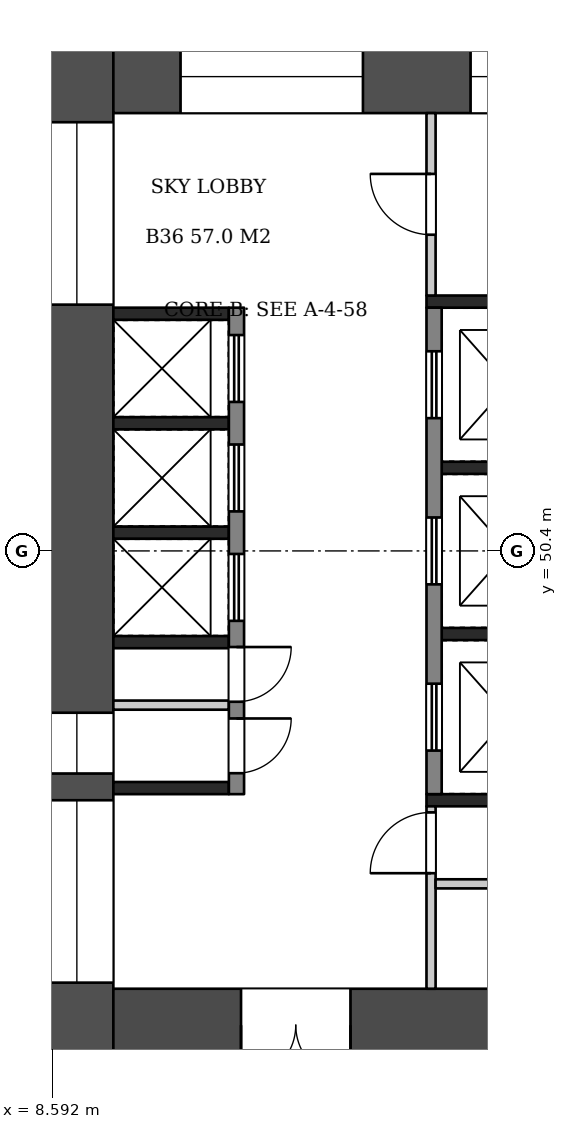
"""IFC4 building model, lengths in metres.
Left out: names, types, materials, properties, quantities, classifications, styles, units other than length and angle.
Written with IfcOpenShell. Run it as: python <this file> out.ifc"""

import sys

from ifc_helpers import new_model, si_unit, direction, frame, frame_2d, origin, place, context, subcontext, project, spatial, rectangle, extrude, element, fill, save


model = new_model("IFC4")
c1 = context("Model", 3, precision=1e-05, world=origin(), true_north=direction((0.0, 1.0)))
c2 = subcontext(c1, "Body", "Model", "MODEL_VIEW")
j1 = project(units=[si_unit("LENGTHUNIT", "METRE"), si_unit("PLANEANGLEUNIT", "RADIAN")], contexts=[c1])
p1 = place(None, origin())
s1 = spatial("IfcSite", under=j1, at=p1, CompositionType="ELEMENT")
p2 = place(p1, origin())
s2 = spatial("IfcBuilding", under=s1, at=p2, CompositionType="ELEMENT")
p3 = place(p2, frame((0.0, 0.0, 140.7)))
s3 = spatial("IfcBuildingStorey", under=s2, at=p3, CompositionType="ELEMENT", Elevation=140.7)
p4 = place(p3, frame((9.0, 58.8, 0.0), z_axis=(0.0, 0.0, 1.0), x_axis=(0.0, -1.0, 0.0)))
e1 = element("IfcWall", 1, at=p4, inside=s3, PredefinedType="SHEAR", context=c2, shape_type="SweptSolid", body=[
    extrude(rectangle(XDim=16.8, YDim=1.2, at=frame_2d((8.4, 0.0))), origin(), (0.0, 0.0, 1.0), 6.72),
])
p5 = place(p4, frame((1.35, 0.0, 0.6)))
e2 = element("IfcOpeningElement", 2, at=p5, cuts=e1, PredefinedType="OPENING", context=c2, shape_type="SweptSolid", body=[
    extrude(rectangle(XDim=3.0, YDim=2.1, at=frame_2d((1.5, 1.05))), frame((0.0, 0.61, 0.0), z_axis=(0.0, -1.0, 0.0), x_axis=(1.0, 0.0, 0.0)), (0.0, 0.0, 1.0), 1.22),
])
p6 = place(p4, frame((11.061, 0.0, 1.6)))
e3 = element("IfcOpeningElement", 3, at=p6, cuts=e1, PredefinedType="OPENING", context=c2, shape_type="SweptSolid", body=[
    extrude(rectangle(XDim=1.0, YDim=1.2, at=frame_2d((0.5, 0.6))), frame((0.0, 0.61, 0.0), z_axis=(0.0, -1.0, 0.0), x_axis=(1.0, 0.0, 0.0)), (0.0, 0.0, 1.0), 1.22),
])
p7 = place(p4, frame((12.5, 0.0, 0.6)))
e4 = element("IfcOpeningElement", 4, at=p7, cuts=e1, PredefinedType="OPENING", context=c2, shape_type="SweptSolid", body=[
    extrude(rectangle(XDim=3.0, YDim=2.1, at=frame_2d((1.5, 1.05))), frame((0.0, 0.61, 0.0), z_axis=(0.0, -1.0, 0.0), x_axis=(1.0, 0.0, 0.0)), (0.0, 0.0, 1.0), 1.22),
])
p8 = place(p3, frame((9.6, 58.2, 0.0), z_axis=(0.0, 0.0, 1.0), x_axis=(1.0, 0.0, 0.0)))
e5 = element("IfcWall", 5, at=p8, inside=s3, PredefinedType="SHEAR", context=c2, shape_type="SweptSolid", body=[
    extrude(rectangle(XDim=14.4, YDim=1.2, at=frame_2d((7.2, 0.0))), origin(), (0.0, 0.0, 1.0), 6.72),
])
p9 = place(p8, frame((1.105, 0.0, 0.6)))
e6 = element("IfcOpeningElement", 6, at=p9, cuts=e5, PredefinedType="OPENING", context=c2, shape_type="SweptSolid", body=[
    extrude(rectangle(XDim=3.0, YDim=2.1, at=frame_2d((1.5, 1.05))), frame((0.0, 0.61, 0.0), z_axis=(0.0, -1.0, 0.0), x_axis=(1.0, 0.0, 0.0)), (0.0, 0.0, 1.0), 1.22),
])
p10 = place(p8, frame((5.875, 0.0, 0.6)))
e7 = element("IfcOpeningElement", 7, at=p10, cuts=e5, PredefinedType="OPENING", context=c2, shape_type="SweptSolid", body=[
    extrude(rectangle(XDim=2.4, YDim=2.1, at=frame_2d((1.2, 1.05))), frame((0.0, 0.61, 0.0), z_axis=(0.0, -1.0, 0.0), x_axis=(1.0, 0.0, 0.0)), (0.0, 0.0, 1.0), 1.22),
])
p11 = place(p8, frame((9.993, 0.0, 0.5)))
e8 = element("IfcOpeningElement", 8, at=p11, cuts=e5, PredefinedType="OPENING", context=c2, shape_type="SweptSolid", body=[
    extrude(rectangle(XDim=1.2, YDim=2.4, at=frame_2d((0.6, 1.2))), frame((0.0, 0.61, 0.0), z_axis=(0.0, -1.0, 0.0), x_axis=(1.0, 0.0, 0.0)), (0.0, 0.0, 1.0), 1.22),
])
p12 = place(p8, frame((12.197, 0.0, 0.5)))
e9 = element("IfcOpeningElement", 9, at=p12, cuts=e5, PredefinedType="OPENING", context=c2, shape_type="SweptSolid", body=[
    extrude(rectangle(XDim=1.2, YDim=2.4, at=frame_2d((0.6, 1.2))), frame((0.0, 0.61, 0.0), z_axis=(0.0, -1.0, 0.0), x_axis=(1.0, 0.0, 0.0)), (0.0, 0.0, 1.0), 1.22),
])
p13 = place(p3, frame((9.6, 42.6, 0.0), z_axis=(0.0, 0.0, 1.0), x_axis=(1.0, 0.0, 0.0)))
e10 = element("IfcWall", 10, at=p13, inside=s3, PredefinedType="SHEAR", context=c2, shape_type="SweptSolid", body=[
    extrude(rectangle(XDim=14.4, YDim=1.2, at=frame_2d((7.2, 0.0))), origin(), (0.0, 0.0, 1.0), 6.72),
])
p14 = place(p13, frame((2.1, 0.0, 0.0)))
e11 = element("IfcOpeningElement", 11, at=p14, cuts=e10, PredefinedType="OPENING", context=c2, shape_type="SweptSolid", body=[
    extrude(rectangle(XDim=1.8, YDim=2.1, at=frame_2d((0.9, 1.05))), frame((0.0, 0.61, 0.0), z_axis=(0.0, -1.0, 0.0), x_axis=(1.0, 0.0, 0.0)), (0.0, 0.0, 1.0), 1.22),
])
for number, where, z_axis, x_axis in (
    (12, (9.6, 54.3, 0.0), (0.0, 0.0, 1.0), (1.0, 0.0, 0.0)),
    (13, (9.6, 52.5, 0.0), (0.0, 0.0, 1.0), (1.0, 0.0, 0.0)),
    (14, (9.6, 50.7, 0.0), (0.0, 0.0, 1.0), (1.0, 0.0, 0.0)),
    (15, (9.6, 48.9, 0.0), (0.0, 0.0, 1.0), (1.0, 0.0, 0.0)),
    (16, (9.6, 46.5, 0.0), (0.0, 0.0, 1.0), (1.0, 0.0, 0.0)),
):
    element("IfcWall", number, at=place(p3, frame(where, z_axis=z_axis, x_axis=x_axis)), inside=s3, PredefinedType="SHEAR", context=c2, shape_type="SweptSolid", body=[
        extrude(rectangle(XDim=1.9, YDim=0.2, at=frame_2d((0.95, 0.0))), origin(), (0.0, 0.0, 1.0), 6.72),
    ])
p15 = place(p3, frame((9.6, 47.864, 0.0), z_axis=(0.0, 0.0, 1.0), x_axis=(1.0, 0.0, 0.0)))
e17 = element("IfcWall", 17, at=p15, inside=s3, PredefinedType="PARTITIONING", context=c2, shape_type="SweptSolid", body=[
    extrude(rectangle(XDim=1.9, YDim=0.15, at=frame_2d((0.95, 0.0))), origin(), (0.0, 0.0, 1.0), 6.72),
])
p16 = place(p3, frame((11.625, 54.4, 0.0), z_axis=(0.0, 0.0, 1.0), x_axis=(0.0, -1.0, 0.0)))
e18 = element("IfcWall", 18, at=p16, inside=s3, PredefinedType="SHEAR", context=c2, shape_type="SweptSolid", body=[
    extrude(rectangle(XDim=8.0, YDim=0.25, at=frame_2d((4.0, 0.0))), origin(), (0.0, 0.0, 1.0), 6.72),
])
p17 = place(p16, frame((0.45, 0.0, 0.0)))
e19 = element("IfcOpeningElement", 19, at=p17, cuts=e18, PredefinedType="OPENING", context=c2, shape_type="SweptSolid", body=[
    extrude(rectangle(XDim=1.1, YDim=2.1, at=frame_2d((0.55, 1.05))), frame((0.0, 0.135, 0.0), z_axis=(0.0, -1.0, 0.0), x_axis=(1.0, 0.0, 0.0)), (0.0, 0.0, 1.0), 0.27),
])
p18 = place(p16, frame((2.25, 0.0, 0.0)))
e20 = element("IfcOpeningElement", 20, at=p18, cuts=e18, PredefinedType="OPENING", context=c2, shape_type="SweptSolid", body=[
    extrude(rectangle(XDim=1.1, YDim=2.1, at=frame_2d((0.55, 1.05))), frame((0.0, 0.135, 0.0), z_axis=(0.0, -1.0, 0.0), x_axis=(1.0, 0.0, 0.0)), (0.0, 0.0, 1.0), 0.27),
])
p19 = place(p16, frame((4.05, 0.0, 0.0)))
e21 = element("IfcOpeningElement", 21, at=p19, cuts=e18, PredefinedType="OPENING", context=c2, shape_type="SweptSolid", body=[
    extrude(rectangle(XDim=1.1, YDim=2.1, at=frame_2d((0.55, 1.05))), frame((0.0, 0.135, 0.0), z_axis=(0.0, -1.0, 0.0), x_axis=(1.0, 0.0, 0.0)), (0.0, 0.0, 1.0), 0.27),
])
p20 = place(p16, frame((5.581, 0.0, 0.0)))
e22 = element("IfcOpeningElement", 22, at=p20, cuts=e18, PredefinedType="OPENING", context=c2, shape_type="SweptSolid", body=[
    extrude(rectangle(XDim=0.9, YDim=2.1, at=frame_2d((0.45, 1.05))), frame((0.0, 0.135, 0.0), z_axis=(0.0, -1.0, 0.0), x_axis=(1.0, 0.0, 0.0)), (0.0, 0.0, 1.0), 0.27),
])
p21 = place(p16, frame((6.756, 0.0, 0.0)))
e23 = element("IfcOpeningElement", 23, at=p21, cuts=e18, PredefinedType="OPENING", context=c2, shape_type="SweptSolid", body=[
    extrude(rectangle(XDim=0.9, YDim=2.1, at=frame_2d((0.45, 1.05))), frame((0.0, 0.135, 0.0), z_axis=(0.0, -1.0, 0.0), x_axis=(1.0, 0.0, 0.0)), (0.0, 0.0, 1.0), 0.27),
])
for number, where, z_axis, x_axis in (
    (24, (15.0, 51.767, 0.0), (0.0, 0.0, 1.0), (1.0, 0.0, 0.0)),
    (25, (15.0, 49.033, 0.0), (0.0, 0.0, 1.0), (1.0, 0.0, 0.0)),
):
    element("IfcWall", number, at=place(p3, frame(where, z_axis=z_axis, x_axis=x_axis)), inside=s3, PredefinedType="SHEAR", context=c2, shape_type="SweptSolid", body=[
        extrude(rectangle(XDim=1.9, YDim=0.2, at=frame_2d((0.95, 0.0))), origin(), (0.0, 0.0, 1.0), 6.72),
    ])
p22 = place(p3, frame((14.875, 54.4, 0.0), z_axis=(0.0, 0.0, 1.0), x_axis=(0.0, -1.0, 0.0)))
e26 = element("IfcWall", 26, at=p22, inside=s3, PredefinedType="SHEAR", context=c2, shape_type="SweptSolid", body=[
    extrude(rectangle(XDim=8.0, YDim=0.25, at=frame_2d((4.0, 0.0))), origin(), (0.0, 0.0, 1.0), 6.72),
])
p23 = place(p22, frame((0.717, 0.0, 0.0)))
e27 = element("IfcOpeningElement", 27, at=p23, cuts=e26, PredefinedType="OPENING", context=c2, shape_type="SweptSolid", body=[
    extrude(rectangle(XDim=1.1, YDim=2.1, at=frame_2d((0.55, 1.05))), frame((0.0, 0.135, 0.0), z_axis=(0.0, -1.0, 0.0), x_axis=(1.0, 0.0, 0.0)), (0.0, 0.0, 1.0), 0.27),
])
p24 = place(p22, frame((3.45, 0.0, 0.0)))
e28 = element("IfcOpeningElement", 28, at=p24, cuts=e26, PredefinedType="OPENING", context=c2, shape_type="SweptSolid", body=[
    extrude(rectangle(XDim=1.1, YDim=2.1, at=frame_2d((0.55, 1.05))), frame((0.0, 0.135, 0.0), z_axis=(0.0, -1.0, 0.0), x_axis=(1.0, 0.0, 0.0)), (0.0, 0.0, 1.0), 0.27),
])
p25 = place(p22, frame((6.183, 0.0, 0.0)))
e29 = element("IfcOpeningElement", 29, at=p25, cuts=e26, PredefinedType="OPENING", context=c2, shape_type="SweptSolid", body=[
    extrude(rectangle(XDim=1.1, YDim=2.1, at=frame_2d((0.55, 1.05))), frame((0.0, 0.135, 0.0), z_axis=(0.0, -1.0, 0.0), x_axis=(1.0, 0.0, 0.0)), (0.0, 0.0, 1.0), 0.27),
])
p26 = place(p3, frame((14.75, 54.5, 0.0), z_axis=(0.0, 0.0, 1.0), x_axis=(1.0, 0.0, 0.0)))
e30 = element("IfcWall", 30, at=p26, inside=s3, PredefinedType="SHEAR", context=c2, shape_type="SweptSolid", body=[
    extrude(rectangle(XDim=2.4, YDim=0.2, at=frame_2d((1.2, 0.0))), origin(), (0.0, 0.0, 1.0), 6.72),
])
p27 = place(p3, frame((14.825, 57.6, 0.0), z_axis=(0.0, 0.0, 1.0), x_axis=(0.0, -1.0, 0.0)))
e31 = element("IfcWall", 31, at=p27, inside=s3, PredefinedType="PARTITIONING", context=c2, shape_type="SweptSolid", body=[
    extrude(rectangle(XDim=3.0, YDim=0.15, at=frame_2d((1.5, 0.0))), origin(), (0.0, 0.0, 1.0), 6.72),
])
p28 = place(p27, frame((1.0, 0.0, 0.0)))
e32 = element("IfcOpeningElement", 32, at=p28, cuts=e31, PredefinedType="OPENING", context=c2, shape_type="SweptSolid", body=[
    extrude(rectangle(XDim=1.0, YDim=2.1, at=frame_2d((0.5, 1.05))), frame((0.0, 0.085, 0.0), z_axis=(0.0, -1.0, 0.0), x_axis=(1.0, 0.0, 0.0)), (0.0, 0.0, 1.0), 0.17),
])
p29 = place(p3, frame((14.75, 46.3, 0.0), z_axis=(0.0, 0.0, 1.0), x_axis=(1.0, 0.0, 0.0)))
e33 = element("IfcWall", 33, at=p29, inside=s3, PredefinedType="SHEAR", context=c2, shape_type="SweptSolid", body=[
    extrude(rectangle(XDim=9.25, YDim=0.2, at=frame_2d((4.625, 0.0))), origin(), (0.0, 0.0, 1.0), 6.72),
])
p30 = place(p3, frame((14.825, 46.2, 0.0), z_axis=(0.0, 0.0, 1.0), x_axis=(0.0, -1.0, 0.0)))
e34 = element("IfcWall", 34, at=p30, inside=s3, PredefinedType="PARTITIONING", context=c2, shape_type="SweptSolid", body=[
    extrude(rectangle(XDim=3.0, YDim=0.15, at=frame_2d((1.5, 0.0))), origin(), (0.0, 0.0, 1.0), 6.72),
])
p31 = place(p30, frame((0.1, 0.0, 0.0)))
e35 = element("IfcOpeningElement", 35, at=p31, cuts=e34, PredefinedType="OPENING", context=c2, shape_type="SweptSolid", body=[
    extrude(rectangle(XDim=1.0, YDim=2.1, at=frame_2d((0.5, 1.05))), frame((0.0, 0.085, 0.0), z_axis=(0.0, -1.0, 0.0), x_axis=(1.0, 0.0, 0.0)), (0.0, 0.0, 1.0), 0.17),
])
p32 = place(p3, frame((14.9, 44.925, 0.0), z_axis=(0.0, 0.0, 1.0), x_axis=(1.0, 0.0, 0.0)))
e36 = element("IfcWall", 36, at=p32, inside=s3, PredefinedType="PARTITIONING", context=c2, shape_type="SweptSolid", body=[
    extrude(rectangle(XDim=9.1, YDim=0.15, at=frame_2d((4.55, 0.0))), origin(), (0.0, 0.0, 1.0), 6.72),
])
p33 = place(p32, frame((0.87, 0.0, 0.0)))
e37 = element("IfcOpeningElement", 37, at=p33, cuts=e36, PredefinedType="OPENING", context=c2, shape_type="SweptSolid", body=[
    extrude(rectangle(XDim=0.9, YDim=2.1, at=frame_2d((0.45, 1.05))), frame((0.0, 0.085, 0.0), z_axis=(0.0, -1.0, 0.0), x_axis=(1.0, 0.0, 0.0)), (0.0, 0.0, 1.0), 0.17),
])
p34 = place(p32, frame((3.748, 0.0, 0.0)))
e38 = element("IfcOpeningElement", 38, at=p34, cuts=e36, PredefinedType="OPENING", context=c2, shape_type="SweptSolid", body=[
    extrude(rectangle(XDim=0.9, YDim=2.1, at=frame_2d((0.45, 1.05))), frame((0.0, 0.085, 0.0), z_axis=(0.0, -1.0, 0.0), x_axis=(1.0, 0.0, 0.0)), (0.0, 0.0, 1.0), 0.17),
])
p35 = place(p32, frame((6.978, 0.0, 0.0)))
e39 = element("IfcOpeningElement", 39, at=p35, cuts=e36, PredefinedType="OPENING", context=c2, shape_type="SweptSolid", body=[
    extrude(rectangle(XDim=0.9, YDim=2.1, at=frame_2d((0.45, 1.05))), frame((0.0, 0.085, 0.0), z_axis=(0.0, -1.0, 0.0), x_axis=(1.0, 0.0, 0.0)), (0.0, 0.0, 1.0), 0.17),
])
p36 = place(p14, frame((1.8, 0.0, 0.0), z_axis=(0.0, 0.0, 1.0), x_axis=(-1.0, 0.0, 0.0)))
e40 = element("IfcDoor", 40, at=p36, inside=s3, OperationType="DOUBLE_DOOR_SINGLE_SWING", PredefinedType="DOOR", context=c2, shape_type="SweptSolid", body=[
    extrude(rectangle(XDim=1.8, YDim=2.1, at=frame_2d((0.9, 1.05))), frame((0.0, 0.025, 0.0), z_axis=(0.0, -1.0, 0.0), x_axis=(1.0, 0.0, 0.0)), (0.0, 0.0, 1.0), 0.05),
])
fill(e11, e40)
p37 = place(p17, origin())
e41 = element("IfcDoor", 41, at=p37, inside=s3, OperationType="DOUBLE_DOOR_SLIDING", PredefinedType="DOOR", context=c2, shape_type="SweptSolid", body=[
    extrude(rectangle(XDim=1.1, YDim=2.1, at=frame_2d((0.55, 1.05))), frame((0.0, 0.025, 0.0), z_axis=(0.0, -1.0, 0.0), x_axis=(1.0, 0.0, 0.0)), (0.0, 0.0, 1.0), 0.05),
])
fill(e19, e41)
p38 = place(p18, origin())
e42 = element("IfcDoor", 42, at=p38, inside=s3, OperationType="DOUBLE_DOOR_SLIDING", PredefinedType="DOOR", context=c2, shape_type="SweptSolid", body=[
    extrude(rectangle(XDim=1.1, YDim=2.1, at=frame_2d((0.55, 1.05))), frame((0.0, 0.025, 0.0), z_axis=(0.0, -1.0, 0.0), x_axis=(1.0, 0.0, 0.0)), (0.0, 0.0, 1.0), 0.05),
])
fill(e20, e42)
p39 = place(p19, origin())
e43 = element("IfcDoor", 43, at=p39, inside=s3, OperationType="DOUBLE_DOOR_SLIDING", PredefinedType="DOOR", context=c2, shape_type="SweptSolid", body=[
    extrude(rectangle(XDim=1.1, YDim=2.1, at=frame_2d((0.55, 1.05))), frame((0.0, 0.025, 0.0), z_axis=(0.0, -1.0, 0.0), x_axis=(1.0, 0.0, 0.0)), (0.0, 0.0, 1.0), 0.05),
])
fill(e21, e43)
p40 = place(p20, origin())
e44 = element("IfcDoor", 44, at=p40, inside=s3, OperationType="SINGLE_SWING_LEFT", PredefinedType="DOOR", context=c2, shape_type="SweptSolid", body=[
    extrude(rectangle(XDim=0.9, YDim=2.1, at=frame_2d((0.45, 1.05))), frame((0.0, 0.025, 0.0), z_axis=(0.0, -1.0, 0.0), x_axis=(1.0, 0.0, 0.0)), (0.0, 0.0, 1.0), 0.05),
])
fill(e22, e44)
p41 = place(p21, origin())
e45 = element("IfcDoor", 45, at=p41, inside=s3, OperationType="SINGLE_SWING_LEFT", PredefinedType="DOOR", context=c2, shape_type="SweptSolid", body=[
    extrude(rectangle(XDim=0.9, YDim=2.1, at=frame_2d((0.45, 1.05))), frame((0.0, 0.025, 0.0), z_axis=(0.0, -1.0, 0.0), x_axis=(1.0, 0.0, 0.0)), (0.0, 0.0, 1.0), 0.05),
])
fill(e23, e45)
p42 = place(p23, origin())
e46 = element("IfcDoor", 46, at=p42, inside=s3, OperationType="DOUBLE_DOOR_SLIDING", PredefinedType="DOOR", context=c2, shape_type="SweptSolid", body=[
    extrude(rectangle(XDim=1.1, YDim=2.1, at=frame_2d((0.55, 1.05))), frame((0.0, 0.025, 0.0), z_axis=(0.0, -1.0, 0.0), x_axis=(1.0, 0.0, 0.0)), (0.0, 0.0, 1.0), 0.05),
])
fill(e27, e46)
p43 = place(p24, origin())
e47 = element("IfcDoor", 47, at=p43, inside=s3, OperationType="DOUBLE_DOOR_SLIDING", PredefinedType="DOOR", context=c2, shape_type="SweptSolid", body=[
    extrude(rectangle(XDim=1.1, YDim=2.1, at=frame_2d((0.55, 1.05))), frame((0.0, 0.025, 0.0), z_axis=(0.0, -1.0, 0.0), x_axis=(1.0, 0.0, 0.0)), (0.0, 0.0, 1.0), 0.05),
])
fill(e28, e47)
p44 = place(p25, origin())
e48 = element("IfcDoor", 48, at=p44, inside=s3, OperationType="DOUBLE_DOOR_SLIDING", PredefinedType="DOOR", context=c2, shape_type="SweptSolid", body=[
    extrude(rectangle(XDim=1.1, YDim=2.1, at=frame_2d((0.55, 1.05))), frame((0.0, 0.025, 0.0), z_axis=(0.0, -1.0, 0.0), x_axis=(1.0, 0.0, 0.0)), (0.0, 0.0, 1.0), 0.05),
])
fill(e29, e48)
p45 = place(p28, frame((1.0, 0.0, 0.0), z_axis=(0.0, 0.0, 1.0), x_axis=(-1.0, 0.0, 0.0)))
e49 = element("IfcDoor", 49, at=p45, inside=s3, OperationType="SINGLE_SWING_RIGHT", PredefinedType="DOOR", context=c2, shape_type="SweptSolid", body=[
    extrude(rectangle(XDim=1.0, YDim=2.1, at=frame_2d((0.5, 1.05))), frame((0.0, 0.025, 0.0), z_axis=(0.0, -1.0, 0.0), x_axis=(1.0, 0.0, 0.0)), (0.0, 0.0, 1.0), 0.05),
])
fill(e32, e49)
p46 = place(p31, frame((1.0, 0.0, 0.0), z_axis=(0.0, 0.0, 1.0), x_axis=(-1.0, 0.0, 0.0)))
e50 = element("IfcDoor", 50, at=p46, inside=s3, OperationType="SINGLE_SWING_LEFT", PredefinedType="DOOR", context=c2, shape_type="SweptSolid", body=[
    extrude(rectangle(XDim=1.0, YDim=2.1, at=frame_2d((0.5, 1.05))), frame((0.0, 0.025, 0.0), z_axis=(0.0, -1.0, 0.0), x_axis=(1.0, 0.0, 0.0)), (0.0, 0.0, 1.0), 0.05),
])
fill(e35, e50)
p47 = place(p5, origin())
e51 = element("IfcWindow", 51, at=p47, inside=s3, PartitioningType="SINGLE_PANEL", PredefinedType="WINDOW", context=c2, shape_type="SweptSolid", body=[
    extrude(rectangle(XDim=3.0, YDim=2.1, at=frame_2d((1.5, 1.05))), frame((0.0, 0.03, 0.0), z_axis=(0.0, -1.0, 0.0), x_axis=(1.0, 0.0, 0.0)), (0.0, 0.0, 1.0), 0.06),
])
fill(e2, e51)
p48 = place(p6, origin())
e52 = element("IfcWindow", 52, at=p48, inside=s3, PartitioningType="SINGLE_PANEL", PredefinedType="WINDOW", context=c2, shape_type="SweptSolid", body=[
    extrude(rectangle(XDim=1.0, YDim=1.2, at=frame_2d((0.5, 0.6))), frame((0.0, 0.03, 0.0), z_axis=(0.0, -1.0, 0.0), x_axis=(1.0, 0.0, 0.0)), (0.0, 0.0, 1.0), 0.06),
])
fill(e3, e52)
p49 = place(p7, origin())
e53 = element("IfcWindow", 53, at=p49, inside=s3, PartitioningType="SINGLE_PANEL", PredefinedType="WINDOW", context=c2, shape_type="SweptSolid", body=[
    extrude(rectangle(XDim=3.0, YDim=2.1, at=frame_2d((1.5, 1.05))), frame((0.0, 0.03, 0.0), z_axis=(0.0, -1.0, 0.0), x_axis=(1.0, 0.0, 0.0)), (0.0, 0.0, 1.0), 0.06),
])
fill(e4, e53)
p50 = place(p9, origin())
e54 = element("IfcWindow", 54, at=p50, inside=s3, PartitioningType="SINGLE_PANEL", PredefinedType="WINDOW", context=c2, shape_type="SweptSolid", body=[
    extrude(rectangle(XDim=3.0, YDim=2.1, at=frame_2d((1.5, 1.05))), frame((0.0, 0.03, 0.0), z_axis=(0.0, -1.0, 0.0), x_axis=(1.0, 0.0, 0.0)), (0.0, 0.0, 1.0), 0.06),
])
fill(e6, e54)
p51 = place(p10, origin())
e55 = element("IfcWindow", 55, at=p51, inside=s3, PartitioningType="SINGLE_PANEL", PredefinedType="WINDOW", context=c2, shape_type="SweptSolid", body=[
    extrude(rectangle(XDim=2.4, YDim=2.1, at=frame_2d((1.2, 1.05))), frame((0.0, 0.03, 0.0), z_axis=(0.0, -1.0, 0.0), x_axis=(1.0, 0.0, 0.0)), (0.0, 0.0, 1.0), 0.06),
])
fill(e7, e55)
save(model, sys.argv[1])
